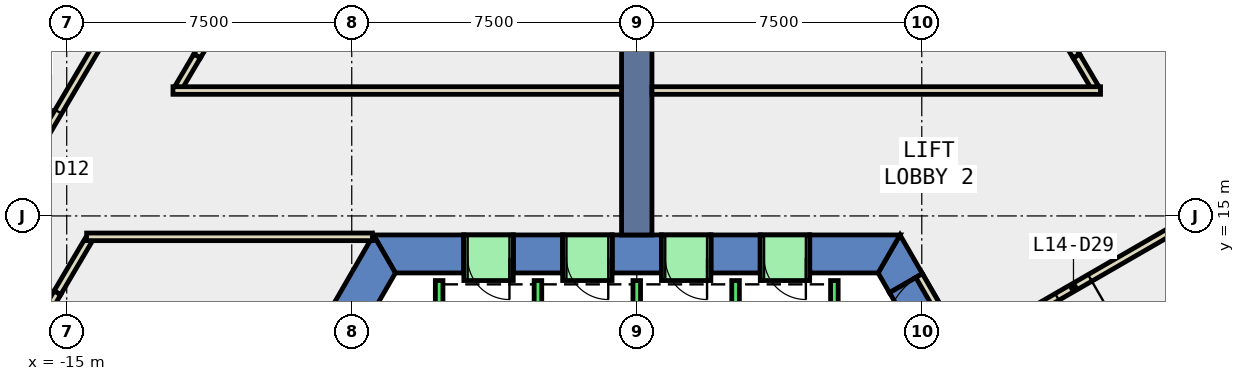
"""IFC4 building model, lengths in metres.
Left out: names, types, materials, properties, quantities, classifications, styles, units other than length and angle.
Written with IfcOpenShell. Run it as: python <this file> out.ifc"""

import sys

from ifc_helpers import new_model, si_unit, direction, frame, frame_2d, origin, place, context, subcontext, project, spatial, polyline, rectangle, outline, extrude, element, fill, save


model = new_model("IFC4")
c1 = context("Model", 3, precision=1e-05, world=origin(), true_north=direction((0.0, 1.0)))
c2 = subcontext(c1, "Body", "Model", "MODEL_VIEW")
j1 = project(units=[si_unit("LENGTHUNIT", "METRE"), si_unit("PLANEANGLEUNIT", "RADIAN")], contexts=[c1])
p1 = place(None, origin())
s1 = spatial("IfcSite", under=j1, at=p1, CompositionType="ELEMENT")
p2 = place(p1, origin())
s2 = spatial("IfcBuilding", under=s1, at=p2, CompositionType="ELEMENT")
p3 = place(p2, frame((0.0, 0.0, 68.6)))
s3 = spatial("IfcBuildingStorey", under=s2, at=p3, CompositionType="ELEMENT", Elevation=68.6)
p4 = place(p3, frame((0.0, 0.0, -0.4)))
e1 = element("IfcWall", 1, at=p4, inside=s3, PredefinedType="SHEAR", context=c2, shape_type="SweptSolid", body=[
    extrude(outline(polyline([(6.651, 12.98), (7.517, 13.48), (6.928, 14.5), (6.351, 13.5), (6.651, 12.98)])), origin(), (0.0, 0.0, 1.0), 4.2),
])
p5 = place(p3, frame((0.0, 0.0, 3.6)))
e2 = element("IfcWall", 2, at=p5, inside=s3, PredefinedType="SHEAR", context=c2, shape_type="SweptSolid", body=[
    extrude(outline(polyline([(7.517, 13.48), (6.651, 12.98), (7.651, 11.248), (8.517, 11.748), (7.517, 13.48)])), origin(), (0.0, 0.0, 1.0), 0.2),
])
p6 = place(p3, frame((0.0, 0.0, -0.4)))
e3 = element("IfcWall", 3, at=p6, inside=s3, PredefinedType="SHEAR", context=c2, shape_type="SweptSolid", body=[
    extrude(outline(polyline([(4.55, 14.5), (4.55, 13.5), (6.351, 13.5), (6.928, 14.5), (4.55, 14.5)])), origin(), (0.0, 0.0, 1.0), 4.2),
])
p7 = place(p3, frame((0.0, 0.0, -0.4)))
e4 = element("IfcWall", 4, at=p7, inside=s3, PredefinedType="SHEAR", context=c2, shape_type="SweptSolid", body=[
    extrude(outline(polyline([(1.95, 14.5), (1.95, 13.5), (3.25, 13.5), (3.25, 14.5), (1.95, 14.5)])), origin(), (0.0, 0.0, 1.0), 4.2),
])
p8 = place(p3, frame((0.0, 0.0, -0.4)))
e5 = element("IfcWall", 5, at=p8, inside=s3, PredefinedType="SHEAR", context=c2, shape_type="SweptSolid", body=[
    extrude(outline(polyline([(-0.65, 14.5), (-0.65, 13.5), (0.65, 13.5), (0.65, 14.5), (-0.65, 14.5)])), origin(), (0.0, 0.0, 1.0), 4.2),
])
p9 = place(p3, frame((0.0, 0.0, -0.4)))
e6 = element("IfcWall", 6, at=p9, inside=s3, PredefinedType="SHEAR", context=c2, shape_type="SweptSolid", body=[
    extrude(outline(polyline([(-3.25, 14.5), (-3.25, 13.5), (-1.95, 13.5), (-1.95, 14.5), (-3.25, 14.5)])), origin(), (0.0, 0.0, 1.0), 4.2),
])
p10 = place(p3, frame((0.0, 0.0, -0.4)))
e7 = element("IfcWall", 7, at=p10, inside=s3, PredefinedType="SHEAR", context=c2, shape_type="SweptSolid", body=[
    extrude(outline(polyline([(-4.55, 13.5), (-4.55, 14.5), (-6.928, 14.5), (-6.351, 13.5), (-4.55, 13.5)])), origin(), (0.0, 0.0, 1.0), 4.2),
])
p11 = place(p3, frame((0.0, 0.0, 3.6)))
e8 = element("IfcWall", 8, at=p11, inside=s3, PredefinedType="SHEAR", context=c2, shape_type="SweptSolid", body=[
    extrude(outline(polyline([(3.25, 14.5), (3.25, 13.5), (4.55, 13.5), (4.55, 14.5), (3.25, 14.5)])), origin(), (0.0, 0.0, 1.0), 0.2),
])
p12 = place(p3, frame((0.0, 0.0, 3.6)))
e9 = element("IfcWall", 9, at=p12, inside=s3, PredefinedType="SHEAR", context=c2, shape_type="SweptSolid", body=[
    extrude(outline(polyline([(0.65, 14.5), (0.65, 13.5), (1.95, 13.5), (1.95, 14.5), (0.65, 14.5)])), origin(), (0.0, 0.0, 1.0), 0.2),
])
p13 = place(p3, frame((0.0, 0.0, 3.6)))
e10 = element("IfcWall", 10, at=p13, inside=s3, PredefinedType="SHEAR", context=c2, shape_type="SweptSolid", body=[
    extrude(outline(polyline([(-1.95, 14.5), (-1.95, 13.5), (-0.65, 13.5), (-0.65, 14.5), (-1.95, 14.5)])), origin(), (0.0, 0.0, 1.0), 0.2),
])
p14 = place(p3, frame((0.0, 0.0, 3.6)))
e11 = element("IfcWall", 11, at=p14, inside=s3, PredefinedType="SHEAR", context=c2, shape_type="SweptSolid", body=[
    extrude(outline(polyline([(-4.55, 14.5), (-4.55, 13.5), (-3.25, 13.5), (-3.25, 14.5), (-4.55, 14.5)])), origin(), (0.0, 0.0, 1.0), 0.2),
])
p15 = place(p3, frame((0.0, 0.0, -0.4)))
e12 = element("IfcWall", 12, at=p15, inside=s3, PredefinedType="SHEAR", context=c2, shape_type="SweptSolid", body=[
    extrude(outline(polyline([(-12.267, 5.252), (-11.402, 4.752), (-6.351, 13.5), (-6.928, 14.5), (-12.267, 5.252)])), origin(), (0.0, 0.0, 1.0), 4.2),
])
p16 = place(p3, frame((0.0, 14.5, -0.4), z_axis=(0.0, 0.0, 1.0), x_axis=(0.0, 1.0, 0.0)))
e13 = element("IfcWall", 13, at=p16, inside=s3, PredefinedType="SHEAR", context=c2, shape_type="SweptSolid", body=[
    extrude(rectangle(XDim=9.0, YDim=0.8, at=frame_2d((4.5, 0.0))), origin(), (0.0, 0.0, 1.0), 4.2),
])
p17 = place(p3, frame((-14.427, 14.364, 0.0), z_axis=(0.0, 0.0, 1.0), x_axis=(-0.508509719672, -0.861056249614, 0.0)))
e14 = element("IfcWall", 14, at=p17, inside=s3, PredefinedType="PARTITIONING", context=c2, shape_type="SweptSolid", body=[
    extrude(rectangle(XDim=1.611, YDim=0.2, at=frame_2d((0.805, 0.0))), origin(), (0.0, 0.0, 1.0), 3.8),
])
p18 = place(p3, frame((-15.246, 12.977, 0.0), z_axis=(0.0, 0.0, 1.0), x_axis=(-0.499891203561, -0.866088208327, 0.0)))
e15 = element("IfcWall", 15, at=p18, inside=s3, PredefinedType="PARTITIONING", context=c2, shape_type="SweptSolid", body=[
    extrude(rectangle(XDim=4.801, YDim=0.2, at=frame_2d((2.4, 0.0))), origin(), (0.0, 0.0, 1.0), 3.8),
])
p19 = place(p3, frame((14.316, 14.75, 0.0), z_axis=(0.0, 0.0, 1.0), x_axis=(-0.865981716183, -0.500075661512, 0.0)))
e16 = element("IfcWall", 16, at=p19, inside=s3, PredefinedType="PARTITIONING", context=c2, shape_type="SweptSolid", body=[
    extrude(rectangle(XDim=6.023, YDim=0.2, at=frame_2d((3.011, 0.0))), origin(), (0.0, 0.0, 1.0), 3.8),
])
p20 = place(p19, frame((2.761, 0.0, 0.0)))
e17 = element("IfcOpeningElement", 17, at=p20, cuts=e16, PredefinedType="OPENING", context=c2, shape_type="SweptSolid", body=[
    extrude(rectangle(XDim=1.0, YDim=2.1, at=frame_2d((0.5, 1.05))), frame((0.0, 0.11, 0.0), z_axis=(0.0, -1.0, 0.0), x_axis=(1.0, 0.0, 0.0)), (0.0, 0.0, 1.0), 0.22),
])
p21 = place(p3, frame((12.054, 18.386, 0.0), z_axis=(0.0, 0.0, 1.0), x_axis=(-0.508048285953, 0.861328589529, 0.0)))
e18 = element("IfcWall", 18, at=p21, inside=s3, PredefinedType="PARTITIONING", context=c2, shape_type="SweptSolid", body=[
    extrude(rectangle(XDim=0.954, YDim=0.2, at=frame_2d((0.477, 0.0))), origin(), (0.0, 0.0, 1.0), 3.8),
])
p22 = place(p3, frame((11.569, 19.208, 0.0), z_axis=(0.0, 0.0, 1.0), x_axis=(-0.516172233954, 0.85648480716, 0.0)))
e19 = element("IfcWall", 19, at=p22, inside=s3, PredefinedType="PARTITIONING", context=c2, shape_type="SweptSolid", body=[
    extrude(rectangle(XDim=7.234, YDim=0.2, at=frame_2d((3.617, 0.0))), origin(), (0.0, 0.0, 1.0), 3.8),
])
p23 = place(p22, frame((2.717, 0.0, 0.0)))
e20 = element("IfcOpeningElement", 20, at=p23, cuts=e19, PredefinedType="OPENING", context=c2, shape_type="SweptSolid", body=[
    extrude(rectangle(XDim=1.8, YDim=2.1, at=frame_2d((0.9, 1.05))), frame((0.0, 0.11, 0.0), z_axis=(0.0, -1.0, 0.0), x_axis=(1.0, 0.0, 0.0)), (0.0, 0.0, 1.0), 0.22),
])
p24 = place(p3, frame((-7.835, 25.404, 0.0), z_axis=(0.0, 0.0, 1.0), x_axis=(-0.516172233954, -0.85648480716, 0.0)))
e21 = element("IfcWall", 21, at=p24, inside=s3, PredefinedType="PARTITIONING", context=c2, shape_type="SweptSolid", body=[
    extrude(rectangle(XDim=7.234, YDim=0.2, at=frame_2d((3.617, 0.0))), origin(), (0.0, 0.0, 1.0), 3.8),
])
p25 = place(p3, frame((-11.569, 19.208, 0.0), z_axis=(0.0, 0.0, 1.0), x_axis=(-0.508048285953, -0.861328589529, 0.0)))
e22 = element("IfcWall", 22, at=p25, inside=s3, PredefinedType="PARTITIONING", context=c2, shape_type="SweptSolid", body=[
    extrude(rectangle(XDim=0.954, YDim=0.2, at=frame_2d((0.477, 0.0))), origin(), (0.0, 0.0, 1.0), 3.8),
])
p26 = place(p3, frame((13.63, 20.437, 0.0), z_axis=(0.0, 0.0, 1.0), x_axis=(0.508298695021, -0.861180838523, 0.0)))
e23 = element("IfcWall", 23, at=p26, inside=s3, PredefinedType="PARTITIONING", context=c2, shape_type="SweptSolid", body=[
    extrude(rectangle(XDim=3.553, YDim=0.2, at=frame_2d((1.777, 0.0))), origin(), (0.0, 0.0, 1.0), 3.8),
])
p27 = place(p3, frame((-17.357, 14.122, 0.0), z_axis=(0.0, 0.0, 1.0), x_axis=(0.508298575594, 0.861180909014, 0.0)))
e24 = element("IfcWall", 24, at=p27, inside=s3, PredefinedType="PARTITIONING", context=c2, shape_type="SweptSolid", body=[
    extrude(rectangle(XDim=7.258, YDim=0.2, at=frame_2d((3.629, 0.0))), origin(), (0.0, 0.0, 1.0), 3.8),
])
p28 = place(p27, frame((3.204, 0.0, 0.0)))
e25 = element("IfcOpeningElement", 25, at=p28, cuts=e24, PredefinedType="OPENING", context=c2, shape_type="SweptSolid", body=[
    extrude(rectangle(XDim=1.0, YDim=2.1, at=frame_2d((0.5, 1.05))), frame((0.0, 0.11, 0.0), z_axis=(0.0, -1.0, 0.0), x_axis=(1.0, 0.0, 0.0)), (0.0, 0.0, 1.0), 0.22),
])
p29 = place(p3, frame((-6.957, 14.45, 0.0), z_axis=(0.0, 0.0, 1.0), x_axis=(-1.0, 0.0, 0.0)))
e26 = element("IfcWall", 26, at=p29, inside=s3, PredefinedType="PARTITIONING", context=c2, shape_type="SweptSolid", body=[
    extrude(rectangle(XDim=7.519, YDim=0.2, at=frame_2d((3.76, 0.0))), origin(), (0.0, 0.0, 1.0), 3.8),
])
p30 = place(p3, frame((-12.204, 18.3, 0.0), z_axis=(0.0, 0.0, 1.0), x_axis=(1.0, 0.0, 0.0)))
e27 = element("IfcWall", 27, at=p30, inside=s3, PredefinedType="PARTITIONING", context=c2, shape_type="SweptSolid", body=[
    extrude(rectangle(XDim=11.804, YDim=0.2, at=frame_2d((5.902, 0.0))), origin(), (0.0, 0.0, 1.0), 3.8),
])
p31 = place(p3, frame((8.43, 11.698, 0.0), z_axis=(0.0, 0.0, 1.0), x_axis=(-0.50002537861, 0.866010750942, 0.0)))
e28 = element("IfcWall", 28, at=p31, inside=s3, PredefinedType="PARTITIONING", context=c2, shape_type="SweptSolid", body=[
    extrude(rectangle(XDim=2.0, YDim=0.2, at=frame_2d((1.0, 0.0))), origin(), (0.0, 0.0, 1.0), 2.4),
])
p32 = place(p31, frame((0.19, 0.0, 0.0)))
e29 = element("IfcOpeningElement", 29, at=p32, cuts=e28, PredefinedType="OPENING", context=c2, shape_type="SweptSolid", body=[
    extrude(rectangle(XDim=1.8, YDim=2.1, at=frame_2d((0.9, 1.05))), frame((0.0, 0.11, 0.0), z_axis=(0.0, -1.0, 0.0), x_axis=(1.0, 0.0, 0.0)), (0.0, 0.0, 1.0), 0.22),
])
p33 = place(p3, frame((0.4, 18.3, 0.0), z_axis=(0.0, 0.0, 1.0), x_axis=(1.0, 0.0, 0.0)))
e30 = element("IfcWall", 30, at=p33, inside=s3, PredefinedType="PARTITIONING", context=c2, shape_type="SweptSolid", body=[
    extrude(rectangle(XDim=11.804, YDim=0.2, at=frame_2d((5.902, 0.0))), origin(), (0.0, 0.0, 1.0), 3.8),
])
for number, where, z_axis, x_axis in (
    (31, (5.2, 10.8, 0.0), (0.0, 0.0, 1.0), (0.0, 1.0, 0.0)),
    (32, (2.6, 10.8, 0.0), (0.0, 0.0, 1.0), (0.0, 1.0, 0.0)),
    (33, (0.0, 10.8, 0.0), (0.0, 0.0, 1.0), (0.0, 1.0, 0.0)),
    (34, (-2.6, 10.8, 0.0), (0.0, 0.0, 1.0), (0.0, 1.0, 0.0)),
    (35, (-5.2, 10.8, 0.0), (0.0, 0.0, 1.0), (0.0, 1.0, 0.0)),
):
    element("IfcWall", number, at=place(p3, frame(where, z_axis=z_axis, x_axis=x_axis)), inside=s3, PredefinedType="STANDARD", context=c2, shape_type="SweptSolid", body=[
        extrude(rectangle(XDim=2.5, YDim=0.2, at=frame_2d((1.25, 0.0))), origin(), (0.0, 0.0, 1.0), 3.8),
    ])
p34 = place(p3, frame((4.55, 13.9, 0.0), z_axis=(0.0, 0.0, 1.0), x_axis=(-1.0, 0.0, 0.0)))
e36 = element("IfcWall", 36, at=p34, inside=s3, PredefinedType="STANDARD", context=c2, shape_type="SweptSolid", body=[
    extrude(rectangle(XDim=1.3, YDim=1.2, at=frame_2d((0.65, 0.0))), origin(), (0.0, 0.0, 1.0), 2.4),
])
p35 = place(p34, frame((0.1, 0.0, 0.0)))
e37 = element("IfcOpeningElement", 37, at=p35, cuts=e36, PredefinedType="OPENING", context=c2, shape_type="SweptSolid", body=[
    extrude(rectangle(XDim=1.1, YDim=2.3, at=frame_2d((0.55, 1.15))), frame((0.0, 0.61, 0.0), z_axis=(0.0, -1.0, 0.0), x_axis=(1.0, 0.0, 0.0)), (0.0, 0.0, 1.0), 1.22),
])
p36 = place(p3, frame((1.95, 13.9, 0.0), z_axis=(0.0, 0.0, 1.0), x_axis=(-1.0, 0.0, 0.0)))
e38 = element("IfcWall", 38, at=p36, inside=s3, PredefinedType="STANDARD", context=c2, shape_type="SweptSolid", body=[
    extrude(rectangle(XDim=1.3, YDim=1.2, at=frame_2d((0.65, 0.0))), origin(), (0.0, 0.0, 1.0), 2.4),
])
p37 = place(p36, frame((0.1, 0.0, 0.0)))
e39 = element("IfcOpeningElement", 39, at=p37, cuts=e38, PredefinedType="OPENING", context=c2, shape_type="SweptSolid", body=[
    extrude(rectangle(XDim=1.1, YDim=2.3, at=frame_2d((0.55, 1.15))), frame((0.0, 0.61, 0.0), z_axis=(0.0, -1.0, 0.0), x_axis=(1.0, 0.0, 0.0)), (0.0, 0.0, 1.0), 1.22),
])
p38 = place(p3, frame((-0.65, 13.9, 0.0), z_axis=(0.0, 0.0, 1.0), x_axis=(-1.0, 0.0, 0.0)))
e40 = element("IfcWall", 40, at=p38, inside=s3, PredefinedType="STANDARD", context=c2, shape_type="SweptSolid", body=[
    extrude(rectangle(XDim=1.3, YDim=1.2, at=frame_2d((0.65, 0.0))), origin(), (0.0, 0.0, 1.0), 2.4),
])
p39 = place(p38, frame((0.1, 0.0, 0.0)))
e41 = element("IfcOpeningElement", 41, at=p39, cuts=e40, PredefinedType="OPENING", context=c2, shape_type="SweptSolid", body=[
    extrude(rectangle(XDim=1.1, YDim=2.3, at=frame_2d((0.55, 1.15))), frame((0.0, 0.61, 0.0), z_axis=(0.0, -1.0, 0.0), x_axis=(1.0, 0.0, 0.0)), (0.0, 0.0, 1.0), 1.22),
])
p40 = place(p3, frame((-3.25, 13.9, 0.0), z_axis=(0.0, 0.0, 1.0), x_axis=(-1.0, 0.0, 0.0)))
e42 = element("IfcWall", 42, at=p40, inside=s3, PredefinedType="STANDARD", context=c2, shape_type="SweptSolid", body=[
    extrude(rectangle(XDim=1.3, YDim=1.2, at=frame_2d((0.65, 0.0))), origin(), (0.0, 0.0, 1.0), 2.4),
])
p41 = place(p40, frame((0.1, 0.0, 0.0)))
e43 = element("IfcOpeningElement", 43, at=p41, cuts=e42, PredefinedType="OPENING", context=c2, shape_type="SweptSolid", body=[
    extrude(rectangle(XDim=1.1, YDim=2.3, at=frame_2d((0.55, 1.15))), frame((0.0, 0.61, 0.0), z_axis=(0.0, -1.0, 0.0), x_axis=(1.0, 0.0, 0.0)), (0.0, 0.0, 1.0), 1.22),
])
p42 = place(p28, origin())
e44 = element("IfcDoor", 44, at=p42, inside=s3, OperationType="SINGLE_SWING_RIGHT", PredefinedType="DOOR", context=c2, shape_type="SweptSolid", body=[
    extrude(rectangle(XDim=1.0, YDim=2.1, at=frame_2d((0.5, 1.05))), frame((0.0, 0.025, 0.0), z_axis=(0.0, -1.0, 0.0), x_axis=(1.0, 0.0, 0.0)), (0.0, 0.0, 1.0), 0.05),
])
fill(e25, e44)
p43 = place(p20, origin())
e45 = element("IfcDoor", 45, at=p43, inside=s3, OperationType="SINGLE_SWING_LEFT", PredefinedType="DOOR", context=c2, shape_type="SweptSolid", body=[
    extrude(rectangle(XDim=1.0, YDim=2.1, at=frame_2d((0.5, 1.05))), frame((0.0, 0.025, 0.0), z_axis=(0.0, -1.0, 0.0), x_axis=(1.0, 0.0, 0.0)), (0.0, 0.0, 1.0), 0.05),
])
fill(e17, e45)
p44 = place(p32, origin())
e46 = element("IfcDoor", 46, at=p44, inside=s3, OperationType="DOUBLE_DOOR_SINGLE_SWING", PredefinedType="DOOR", context=c2, shape_type="SweptSolid", body=[
    extrude(rectangle(XDim=1.8, YDim=2.1, at=frame_2d((0.9, 1.05))), frame((0.0, 0.025, 0.0), z_axis=(0.0, -1.0, 0.0), x_axis=(1.0, 0.0, 0.0)), (0.0, 0.0, 1.0), 0.05),
])
fill(e29, e46)
p45 = place(p35, origin())
e47 = element("IfcDoor", 47, at=p45, inside=s3, OperationType="SLIDING_TO_LEFT", PredefinedType="DOOR", context=c2, shape_type="SweptSolid", body=[
    extrude(rectangle(XDim=1.1, YDim=2.3, at=frame_2d((0.55, 1.15))), frame((0.0, 0.025, 0.0), z_axis=(0.0, -1.0, 0.0), x_axis=(1.0, 0.0, 0.0)), (0.0, 0.0, 1.0), 0.05),
])
fill(e37, e47)
p46 = place(p37, origin())
e48 = element("IfcDoor", 48, at=p46, inside=s3, OperationType="SLIDING_TO_LEFT", PredefinedType="DOOR", context=c2, shape_type="SweptSolid", body=[
    extrude(rectangle(XDim=1.1, YDim=2.3, at=frame_2d((0.55, 1.15))), frame((0.0, 0.025, 0.0), z_axis=(0.0, -1.0, 0.0), x_axis=(1.0, 0.0, 0.0)), (0.0, 0.0, 1.0), 0.05),
])
fill(e39, e48)
p47 = place(p39, origin())
e49 = element("IfcDoor", 49, at=p47, inside=s3, OperationType="SLIDING_TO_LEFT", PredefinedType="DOOR", context=c2, shape_type="SweptSolid", body=[
    extrude(rectangle(XDim=1.1, YDim=2.3, at=frame_2d((0.55, 1.15))), frame((0.0, 0.025, 0.0), z_axis=(0.0, -1.0, 0.0), x_axis=(1.0, 0.0, 0.0)), (0.0, 0.0, 1.0), 0.05),
])
fill(e41, e49)
p48 = place(p41, origin())
e50 = element("IfcDoor", 50, at=p48, inside=s3, OperationType="SLIDING_TO_LEFT", PredefinedType="DOOR", context=c2, shape_type="SweptSolid", body=[
    extrude(rectangle(XDim=1.1, YDim=2.3, at=frame_2d((0.55, 1.15))), frame((0.0, 0.025, 0.0), z_axis=(0.0, -1.0, 0.0), x_axis=(1.0, 0.0, 0.0)), (0.0, 0.0, 1.0), 0.05),
])
fill(e43, e50)
save(model, sys.argv[1])
